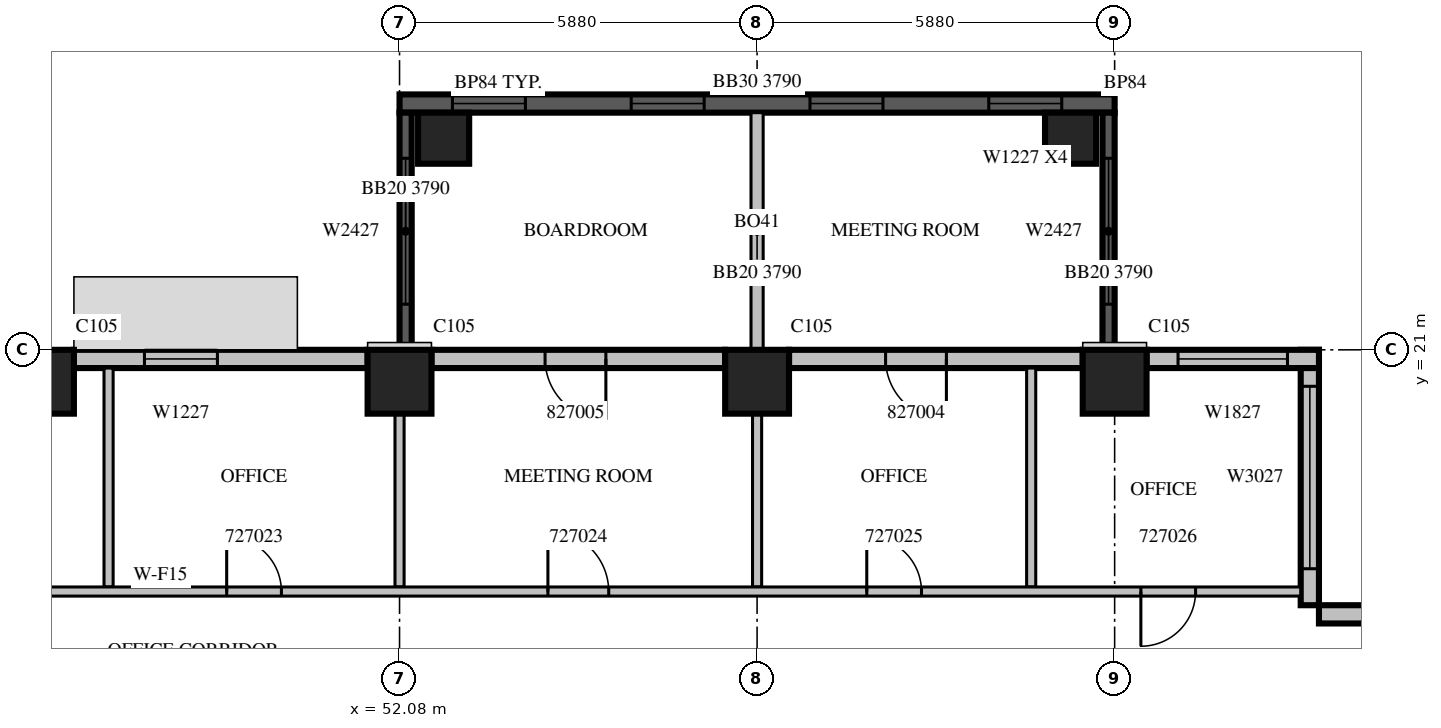
"""IFC4 building model, lengths in metres.
Left out: names, types, materials, properties, quantities, classifications, styles, units other than length and angle.
Written with IfcOpenShell. Run it as: python <this file> out.ifc"""

import sys

from ifc_helpers import new_model, si_unit, direction, frame, frame_2d, origin, origin_2d, place, context, subcontext, project, spatial, rectangle, extrude, source, transform, mapped, element, fill, save


model = new_model("IFC4")
c1 = context("Model", 3, precision=1e-05, world=origin(), true_north=direction((0.0, 1.0)))
c2 = subcontext(c1, "Body", "Model", "MODEL_VIEW")
j1 = project(units=[si_unit("LENGTHUNIT", "METRE"), si_unit("PLANEANGLEUNIT", "RADIAN")], contexts=[c1])
p1 = place(None, origin())
s1 = spatial("IfcSite", under=j1, at=p1, CompositionType="ELEMENT")
p2 = place(p1, origin())
s2 = spatial("IfcBuilding", under=s1, at=p2, CompositionType="ELEMENT")
p3 = place(p2, frame((0.0, 0.0, 124.5)))
s3 = spatial("IfcBuildingStorey", under=s2, at=p3, CompositionType="ELEMENT", Elevation=124.5)
m1 = source(origin(), c2, "Body", "SweptSolid", [
    extrude(rectangle(XDim=1.05, YDim=1.05, at=origin_2d()), origin(), (0.0, 0.0, 1.0), 4.2),
])
for number, where, z_axis, x_axis in (
    (1, (46.2, 20.475, 0.0), (0.0, 0.0, 1.0), (1.0, 0.0, 0.0)),
    (2, (52.08, 20.475, 0.0), (0.0, 0.0, 1.0), (1.0, 0.0, 0.0)),
    (3, (57.96, 20.475, 0.0), (0.0, 0.0, 1.0), (1.0, 0.0, 0.0)),
    (4, (63.84, 20.475, 0.0), (0.0, 0.0, 1.0), (1.0, 0.0, 0.0)),
):
    element("IfcColumn", number, at=place(p3, frame(where, z_axis=z_axis, x_axis=x_axis)), inside=s3, PredefinedType="COLUMN", context=c2, shape_type="MappedRepresentation", body=[
        mapped(m1, transform((0.0, 0.0, 0.0), scale=1.0)),
    ])
m2 = source(origin(), c2, "Body", "SweptSolid", [
    extrude(rectangle(XDim=0.84, YDim=0.84, at=origin_2d()), origin(), (0.0, 0.0, 1.0), 4.2),
])
for number, where, z_axis, x_axis in (
    (5, (52.805, 24.48, 0.0), (0.0, 0.0, 1.0), (1.0, 0.0, 0.0)),
    (6, (63.115, 24.48, 0.0), (0.0, 0.0, 1.0), (1.0, 0.0, 0.0)),
):
    element("IfcColumn", number, at=place(p3, frame(where, z_axis=z_axis, x_axis=x_axis)), inside=s3, PredefinedType="COLUMN", context=c2, shape_type="MappedRepresentation", body=[
        mapped(m2, transform((0.0, 0.0, 0.0), scale=1.0)),
    ])
m3 = source(origin(), c2, "Body", "SweptSolid", [
    extrude(rectangle(XDim=11.76, YDim=0.3, at=frame_2d((5.88, 0.0))), origin(), (0.0, 0.0, 1.0), 3.79),
])
p4 = place(p3, frame((63.84, 25.05, 0.0), z_axis=(0.0, 0.0, 1.0), x_axis=(-1.0, 0.0, 0.0)))
e7 = element("IfcWall", 7, at=p4, inside=s3, PredefinedType="SOLIDWALL", context=c2, shape_type="MappedRepresentation", body=[
    mapped(m3, transform((0.0, 0.0, 0.0), scale=1.0)),
])
m4 = source(origin(), c2, "Body", "SweptSolid", [
    extrude(rectangle(XDim=1.2, YDim=2.7, at=frame_2d((0.6, 1.35))), frame((0.0, 0.16, 0.0), z_axis=(0.0, -1.0, 0.0), x_axis=(1.0, 0.0, 0.0)), (0.0, 0.0, 1.0), 0.32),
])
p5 = place(p4, frame((0.87, 0.0, 0.6)))
e8 = element("IfcOpeningElement", 8, at=p5, cuts=e7, PredefinedType="OPENING", context=c2, shape_type="MappedRepresentation", body=[
    mapped(m4, transform((0.0, 0.0, 0.0), scale=1.0)),
])
p6 = place(p4, frame((3.81, 0.0, 0.6)))
e9 = element("IfcOpeningElement", 9, at=p6, cuts=e7, PredefinedType="OPENING", context=c2, shape_type="MappedRepresentation", body=[
    mapped(m4, transform((0.0, 0.0, 0.0), scale=1.0)),
])
p7 = place(p4, frame((6.75, 0.0, 0.6)))
e10 = element("IfcOpeningElement", 10, at=p7, cuts=e7, PredefinedType="OPENING", context=c2, shape_type="MappedRepresentation", body=[
    mapped(m4, transform((0.0, 0.0, 0.0), scale=1.0)),
])
p8 = place(p4, frame((9.69, 0.0, 0.6)))
e11 = element("IfcOpeningElement", 11, at=p8, cuts=e7, PredefinedType="OPENING", context=c2, shape_type="MappedRepresentation", body=[
    mapped(m4, transform((0.0, 0.0, 0.0), scale=1.0)),
])
m5 = source(origin(), c2, "Body", "SweptSolid", [
    extrude(rectangle(XDim=3.9, YDim=0.2, at=frame_2d((1.95, 0.0))), origin(), (0.0, 0.0, 1.0), 3.79),
])
p9 = place(p3, frame((57.96, 21.0, 0.0), z_axis=(0.0, 0.0, 1.0), x_axis=(0.0, 1.0, 0.0)))
e12 = element("IfcWall", 12, at=p9, inside=s3, PredefinedType="SOLIDWALL", context=c2, shape_type="MappedRepresentation", body=[
    mapped(m5, transform((0.0, 0.0, 0.0), scale=1.0)),
])
m6 = source(origin(), c2, "Body", "SweptSolid", [
    extrude(rectangle(XDim=3.9, YDim=0.2, at=frame_2d((1.95, 0.0))), origin(), (0.0, 0.0, 1.0), 3.79),
])
p10 = place(p3, frame((63.74, 21.0, 0.0), z_axis=(0.0, 0.0, 1.0), x_axis=(0.0, 1.0, 0.0)))
e13 = element("IfcWall", 13, at=p10, inside=s3, PredefinedType="SOLIDWALL", context=c2, shape_type="MappedRepresentation", body=[
    mapped(m6, transform((0.0, 0.0, 0.0), scale=1.0)),
])
m7 = source(origin(), c2, "Body", "SweptSolid", [
    extrude(rectangle(XDim=2.4, YDim=2.7, at=frame_2d((1.2, 1.35))), frame((0.0, 0.11, 0.0), z_axis=(0.0, -1.0, 0.0), x_axis=(1.0, 0.0, 0.0)), (0.0, 0.0, 1.0), 0.22),
])
p11 = place(p10, frame((0.75, 0.0, 0.6)))
e14 = element("IfcOpeningElement", 14, at=p11, cuts=e13, PredefinedType="OPENING", context=c2, shape_type="MappedRepresentation", body=[
    mapped(m7, transform((0.0, 0.0, 0.0), scale=1.0)),
])
p12 = place(p3, frame((52.18, 21.0, 0.0), z_axis=(0.0, 0.0, 1.0), x_axis=(0.0, 1.0, 0.0)))
e15 = element("IfcWall", 15, at=p12, inside=s3, PredefinedType="SOLIDWALL", context=c2, shape_type="MappedRepresentation", body=[
    mapped(m6, transform((0.0, 0.0, 0.0), scale=1.0)),
])
p13 = place(p12, frame((0.75, 0.0, 0.6)))
e16 = element("IfcOpeningElement", 16, at=p13, cuts=e15, PredefinedType="OPENING", context=c2, shape_type="MappedRepresentation", body=[
    mapped(m7, transform((0.0, 0.0, 0.0), scale=1.0)),
])
m8 = source(origin(), c2, "Body", "SweptSolid", [
    extrude(rectangle(XDim=4.2, YDim=0.3, at=frame_2d((2.1, 0.0))), origin(), (0.0, 0.0, 1.0), 3.8),
])
p14 = place(p3, frame((71.4, 16.65, 0.0), z_axis=(0.0, 0.0, 1.0), x_axis=(-1.0, 0.0, 0.0)))
e17 = element("IfcWall", 17, at=p14, inside=s3, PredefinedType="STANDARD", context=c2, shape_type="MappedRepresentation", body=[
    mapped(m8, transform((0.0, 0.0, 0.0), scale=1.0)),
])
p15 = place(p14, frame((0.66, 0.0, 0.6)))
e18 = element("IfcOpeningElement", 18, at=p15, cuts=e17, PredefinedType="OPENING", context=c2, shape_type="MappedRepresentation", body=[
    mapped(m4, transform((0.0, 0.0, 0.0), scale=1.0)),
])
p16 = place(p3, frame((67.05, 16.8, 0.0), z_axis=(0.0, 0.0, 1.0), x_axis=(0.0, 1.0, 0.0)))
e19 = element("IfcWall", 19, at=p16, inside=s3, PredefinedType="STANDARD", context=c2, shape_type="MappedRepresentation", body=[
    mapped(m8, transform((0.0, 0.0, 0.0), scale=1.0)),
])
m9 = source(origin(), c2, "Body", "SweptSolid", [
    extrude(rectangle(XDim=3.0, YDim=2.7, at=frame_2d((1.5, 1.35))), frame((0.0, 0.16, 0.0), z_axis=(0.0, -1.0, 0.0), x_axis=(1.0, 0.0, 0.0)), (0.0, 0.0, 1.0), 0.32),
])
p17 = place(p16, frame((0.6, 0.0, 0.6)))
e20 = element("IfcOpeningElement", 20, at=p17, cuts=e19, PredefinedType="OPENING", context=c2, shape_type="MappedRepresentation", body=[
    mapped(m9, transform((0.0, 0.0, 0.0), scale=1.0)),
])
m10 = source(origin(), c2, "Body", "SweptSolid", [
    extrude(rectangle(XDim=2.835, YDim=0.3, at=frame_2d((1.417, 0.0))), origin(), (0.0, 0.0, 1.0), 3.8),
])
p18 = place(p3, frame((67.2, 20.85, 0.0), z_axis=(0.0, 0.0, 1.0), x_axis=(-1.0, 0.0, 0.0)))
e21 = element("IfcWall", 21, at=p18, inside=s3, PredefinedType="STANDARD", context=c2, shape_type="MappedRepresentation", body=[
    mapped(m10, transform((0.0, 0.0, 0.0), scale=1.0)),
])
m11 = source(origin(), c2, "Body", "SweptSolid", [
    extrude(rectangle(XDim=1.8, YDim=2.7, at=frame_2d((0.9, 1.35))), frame((0.0, 0.16, 0.0), z_axis=(0.0, -1.0, 0.0), x_axis=(1.0, 0.0, 0.0)), (0.0, 0.0, 1.0), 0.32),
])
p19 = place(p18, frame((0.517, 0.0, 0.6)))
e22 = element("IfcOpeningElement", 22, at=p19, cuts=e21, PredefinedType="OPENING", context=c2, shape_type="MappedRepresentation", body=[
    mapped(m11, transform((0.0, 0.0, 0.0), scale=1.0)),
])
m12 = source(origin(), c2, "Body", "SweptSolid", [
    extrude(rectangle(XDim=4.83, YDim=0.3, at=frame_2d((2.415, 0.0))), origin(), (0.0, 0.0, 1.0), 3.8),
])
p20 = place(p3, frame((63.315, 20.85, 0.0), z_axis=(0.0, 0.0, 1.0), x_axis=(-1.0, 0.0, 0.0)))
e23 = element("IfcWall", 23, at=p20, inside=s3, PredefinedType="STANDARD", context=c2, shape_type="MappedRepresentation", body=[
    mapped(m12, transform((0.0, 0.0, 0.0), scale=1.0)),
])
m13 = source(origin(), c2, "Body", "SweptSolid", [
    extrude(rectangle(XDim=1.0, YDim=2.1, at=frame_2d((0.5, 1.05))), frame((0.0, 0.16, 0.0), z_axis=(0.0, -1.0, 0.0), x_axis=(1.0, 0.0, 0.0)), (0.0, 0.0, 1.0), 0.32),
])
p21 = place(p20, frame((2.242, 0.0, 0.0)))
e24 = element("IfcOpeningElement", 24, at=p21, cuts=e23, PredefinedType="OPENING", context=c2, shape_type="MappedRepresentation", body=[
    mapped(m13, transform((0.0, 0.0, 0.0), scale=1.0)),
])
p22 = place(p3, frame((57.435, 20.85, 0.0), z_axis=(0.0, 0.0, 1.0), x_axis=(-1.0, 0.0, 0.0)))
e25 = element("IfcWall", 25, at=p22, inside=s3, PredefinedType="STANDARD", context=c2, shape_type="MappedRepresentation", body=[
    mapped(m12, transform((0.0, 0.0, 0.0), scale=1.0)),
])
p23 = place(p22, frame((1.962, 0.0, 0.0)))
e26 = element("IfcOpeningElement", 26, at=p23, cuts=e25, PredefinedType="OPENING", context=c2, shape_type="MappedRepresentation", body=[
    mapped(m13, transform((0.0, 0.0, 0.0), scale=1.0)),
])
p24 = place(p3, frame((51.555, 20.85, 0.0), z_axis=(0.0, 0.0, 1.0), x_axis=(-1.0, 0.0, 0.0)))
e27 = element("IfcWall", 27, at=p24, inside=s3, PredefinedType="STANDARD", context=c2, shape_type="MappedRepresentation", body=[
    mapped(m12, transform((0.0, 0.0, 0.0), scale=1.0)),
])
p25 = place(p24, frame((2.47, 0.0, 0.6)))
e28 = element("IfcOpeningElement", 28, at=p25, cuts=e27, PredefinedType="OPENING", context=c2, shape_type="MappedRepresentation", body=[
    mapped(m4, transform((0.0, 0.0, 0.0), scale=1.0)),
])
m14 = source(origin(), c2, "Body", "SweptSolid", [
    extrude(rectangle(XDim=3.6, YDim=0.15, at=frame_2d((1.8, 0.0))), origin(), (0.0, 0.0, 1.0), 3.8),
])
for number, where, z_axis, x_axis in (
    (29, (47.295, 20.7, 0.0), (0.0, 0.0, 1.0), (0.0, -1.0, 0.0)),
    (30, (62.468, 20.7, 0.0), (0.0, 0.0, 1.0), (0.0, -1.0, 0.0)),
):
    element("IfcWall", number, at=place(p3, frame(where, z_axis=z_axis, x_axis=x_axis)), inside=s3, PredefinedType="PARTITIONING", context=c2, shape_type="MappedRepresentation", body=[
        mapped(m14, transform((0.0, 0.0, 0.0), scale=1.0)),
    ])
m15 = source(origin(), c2, "Body", "SweptSolid", [
    extrude(rectangle(XDim=2.851, YDim=0.15, at=frame_2d((1.425, 0.0))), origin(), (0.0, 0.0, 1.0), 3.8),
])
for number, where, z_axis, x_axis in (
    (31, (52.08, 17.1, 0.0), (0.0, 0.0, 1.0), (0.0, 1.0, 0.0)),
    (32, (57.96, 17.1, 0.0), (0.0, 0.0, 1.0), (0.0, 1.0, 0.0)),
):
    element("IfcWall", number, at=place(p3, frame(where, z_axis=z_axis, x_axis=x_axis)), inside=s3, PredefinedType="PARTITIONING", context=c2, shape_type="MappedRepresentation", body=[
        mapped(m15, transform((0.0, 0.0, 0.0), scale=1.0)),
    ])
m16 = source(origin(), c2, "Body", "SweptSolid", [
    extrude(rectangle(XDim=37.5, YDim=0.15, at=frame_2d((18.75, 0.0))), origin(), (0.0, 0.0, 1.0), 3.8),
])
p26 = place(p3, frame((29.4, 17.025, 0.0), z_axis=(0.0, 0.0, 1.0), x_axis=(1.0, 0.0, 0.0)))
e33 = element("IfcWall", 33, at=p26, inside=s3, PredefinedType="PARTITIONING", context=c2, shape_type="MappedRepresentation", body=[
    mapped(m16, transform((0.0, 0.0, 0.0), scale=1.0)),
])
m17 = source(origin(), c2, "Body", "SweptSolid", [
    extrude(rectangle(XDim=1.0, YDim=2.1, at=frame_2d((0.5, 1.05))), frame((0.0, 0.085, 0.0), z_axis=(0.0, -1.0, 0.0), x_axis=(1.0, 0.0, 0.0)), (0.0, 0.0, 1.0), 0.17),
])
p27 = place(p26, frame((1.357, 0.0, 0.0)))
e34 = element("IfcOpeningElement", 34, at=p27, cuts=e33, PredefinedType="OPENING", context=c2, shape_type="MappedRepresentation", body=[
    mapped(m17, transform((0.0, 0.0, 0.0), scale=1.0)),
])
p28 = place(p26, frame((4.669, 0.0, 0.0)))
e35 = element("IfcOpeningElement", 35, at=p28, cuts=e33, PredefinedType="OPENING", context=c2, shape_type="MappedRepresentation", body=[
    mapped(m17, transform((0.0, 0.0, 0.0), scale=1.0)),
])
p29 = place(p26, frame((7.012, 0.0, 0.0)))
e36 = element("IfcOpeningElement", 36, at=p29, cuts=e33, PredefinedType="OPENING", context=c2, shape_type="MappedRepresentation", body=[
    mapped(m17, transform((0.0, 0.0, 0.0), scale=1.0)),
])
m18 = source(origin(), c2, "Body", "SweptSolid", [
    extrude(rectangle(XDim=0.9, YDim=2.1, at=frame_2d((0.45, 1.05))), frame((0.0, 0.085, 0.0), z_axis=(0.0, -1.0, 0.0), x_axis=(1.0, 0.0, 0.0)), (0.0, 0.0, 1.0), 0.17),
])
p30 = place(p26, frame((10.342, 0.0, 0.0)))
e37 = element("IfcOpeningElement", 37, at=p30, cuts=e33, PredefinedType="OPENING", context=c2, shape_type="MappedRepresentation", body=[
    mapped(m18, transform((0.0, 0.0, 0.0), scale=1.0)),
])
p31 = place(p26, frame((15.09, 0.0, 0.0)))
e38 = element("IfcOpeningElement", 38, at=p31, cuts=e33, PredefinedType="OPENING", context=c2, shape_type="MappedRepresentation", body=[
    mapped(m18, transform((0.0, 0.0, 0.0), scale=1.0)),
])
p32 = place(p26, frame((19.837, 0.0, 0.0)))
e39 = element("IfcOpeningElement", 39, at=p32, cuts=e33, PredefinedType="OPENING", context=c2, shape_type="MappedRepresentation", body=[
    mapped(m18, transform((0.0, 0.0, 0.0), scale=1.0)),
])
p33 = place(p26, frame((25.12, 0.0, 0.0)))
e40 = element("IfcOpeningElement", 40, at=p33, cuts=e33, PredefinedType="OPENING", context=c2, shape_type="MappedRepresentation", body=[
    mapped(m17, transform((0.0, 0.0, 0.0), scale=1.0)),
])
p34 = place(p26, frame((30.364, 0.0, 0.0)))
e41 = element("IfcOpeningElement", 41, at=p34, cuts=e33, PredefinedType="OPENING", context=c2, shape_type="MappedRepresentation", body=[
    mapped(m18, transform((0.0, 0.0, 0.0), scale=1.0)),
])
p35 = place(p26, frame((34.871, 0.0, 0.0)))
e42 = element("IfcOpeningElement", 42, at=p35, cuts=e33, PredefinedType="OPENING", context=c2, shape_type="MappedRepresentation", body=[
    mapped(m18, transform((0.0, 0.0, 0.0), scale=1.0)),
])
m19 = source(origin(), c2, "Body", "SweptSolid", [
    extrude(rectangle(XDim=1.2, YDim=2.7, at=frame_2d((0.6, 1.35))), frame((0.0, 0.03, 0.0), z_axis=(0.0, -1.0, 0.0), x_axis=(1.0, 0.0, 0.0)), (0.0, 0.0, 1.0), 0.06),
])
p36 = place(p5, origin())
e43 = element("IfcWindow", 43, at=p36, inside=s3, PartitioningType="SINGLE_PANEL", PredefinedType="WINDOW", context=c2, shape_type="MappedRepresentation", body=[
    mapped(m19, transform((0.0, 0.0, 0.0), scale=1.0)),
])
fill(e8, e43)
p37 = place(p6, origin())
e44 = element("IfcWindow", 44, at=p37, inside=s3, PartitioningType="SINGLE_PANEL", PredefinedType="WINDOW", context=c2, shape_type="MappedRepresentation", body=[
    mapped(m19, transform((0.0, 0.0, 0.0), scale=1.0)),
])
fill(e9, e44)
p38 = place(p7, origin())
e45 = element("IfcWindow", 45, at=p38, inside=s3, PartitioningType="SINGLE_PANEL", PredefinedType="WINDOW", context=c2, shape_type="MappedRepresentation", body=[
    mapped(m19, transform((0.0, 0.0, 0.0), scale=1.0)),
])
fill(e10, e45)
p39 = place(p8, origin())
e46 = element("IfcWindow", 46, at=p39, inside=s3, PartitioningType="SINGLE_PANEL", PredefinedType="WINDOW", context=c2, shape_type="MappedRepresentation", body=[
    mapped(m19, transform((0.0, 0.0, 0.0), scale=1.0)),
])
fill(e11, e46)
m20 = source(origin(), c2, "Body", "SweptSolid", [
    extrude(rectangle(XDim=2.4, YDim=2.7, at=frame_2d((1.2, 1.35))), frame((0.0, 0.03, 0.0), z_axis=(0.0, -1.0, 0.0), x_axis=(1.0, 0.0, 0.0)), (0.0, 0.0, 1.0), 0.06),
])
p40 = place(p11, origin())
e47 = element("IfcWindow", 47, at=p40, inside=s3, PartitioningType="SINGLE_PANEL", PredefinedType="WINDOW", context=c2, shape_type="MappedRepresentation", body=[
    mapped(m20, transform((0.0, 0.0, 0.0), scale=1.0)),
])
fill(e14, e47)
p41 = place(p13, origin())
e48 = element("IfcWindow", 48, at=p41, inside=s3, PartitioningType="SINGLE_PANEL", PredefinedType="WINDOW", context=c2, shape_type="MappedRepresentation", body=[
    mapped(m20, transform((0.0, 0.0, 0.0), scale=1.0)),
])
fill(e16, e48)
m21 = source(origin(), c2, "Body", "SweptSolid", [
    extrude(rectangle(XDim=3.0, YDim=2.7, at=frame_2d((1.5, 1.35))), frame((0.0, 0.03, 0.0), z_axis=(0.0, -1.0, 0.0), x_axis=(1.0, 0.0, 0.0)), (0.0, 0.0, 1.0), 0.06),
])
p42 = place(p17, origin())
e49 = element("IfcWindow", 49, at=p42, inside=s3, PartitioningType="SINGLE_PANEL", PredefinedType="WINDOW", context=c2, shape_type="MappedRepresentation", body=[
    mapped(m21, transform((0.0, 0.0, 0.0), scale=1.0)),
])
fill(e20, e49)
p43 = place(p25, origin())
e50 = element("IfcWindow", 50, at=p43, inside=s3, PartitioningType="SINGLE_PANEL", PredefinedType="WINDOW", context=c2, shape_type="MappedRepresentation", body=[
    mapped(m19, transform((0.0, 0.0, 0.0), scale=1.0)),
])
fill(e28, e50)
m22 = source(origin(), c2, "Body", "SweptSolid", [
    extrude(rectangle(XDim=1.8, YDim=2.7, at=frame_2d((0.9, 1.35))), frame((0.0, 0.03, 0.0), z_axis=(0.0, -1.0, 0.0), x_axis=(1.0, 0.0, 0.0)), (0.0, 0.0, 1.0), 0.06),
])
p44 = place(p19, origin())
e51 = element("IfcWindow", 51, at=p44, inside=s3, PartitioningType="SINGLE_PANEL", PredefinedType="WINDOW", context=c2, shape_type="MappedRepresentation", body=[
    mapped(m22, transform((0.0, 0.0, 0.0), scale=1.0)),
])
fill(e22, e51)
m23 = source(origin(), c2, "Body", "SweptSolid", [
    extrude(rectangle(XDim=0.9, YDim=2.1, at=frame_2d((0.45, 1.05))), frame((0.0, 0.025, 0.0), z_axis=(0.0, -1.0, 0.0), x_axis=(1.0, 0.0, 0.0)), (0.0, 0.0, 1.0), 0.05),
])
p45 = place(p32, origin())
e52 = element("IfcDoor", 52, at=p45, inside=s3, OperationType="SINGLE_SWING_LEFT", PredefinedType="DOOR", context=c2, shape_type="MappedRepresentation", body=[
    mapped(m23, transform((0.0, 0.0, 0.0), scale=1.0)),
])
fill(e39, e52)
m24 = source(origin(), c2, "Body", "SweptSolid", [
    extrude(rectangle(XDim=1.0, YDim=2.1, at=frame_2d((0.5, 1.05))), frame((0.0, 0.025, 0.0), z_axis=(0.0, -1.0, 0.0), x_axis=(1.0, 0.0, 0.0)), (0.0, 0.0, 1.0), 0.05),
])
p46 = place(p33, origin())
e53 = element("IfcDoor", 53, at=p46, inside=s3, OperationType="SINGLE_SWING_LEFT", PredefinedType="DOOR", context=c2, shape_type="MappedRepresentation", body=[
    mapped(m24, transform((0.0, 0.0, 0.0), scale=1.0)),
])
fill(e40, e53)
p47 = place(p34, origin())
e54 = element("IfcDoor", 54, at=p47, inside=s3, OperationType="SINGLE_SWING_LEFT", PredefinedType="DOOR", context=c2, shape_type="MappedRepresentation", body=[
    mapped(m23, transform((0.0, 0.0, 0.0), scale=1.0)),
])
fill(e41, e54)
p48 = place(p35, origin())
e55 = element("IfcDoor", 55, at=p48, inside=s3, OperationType="SINGLE_SWING_RIGHT", PredefinedType="DOOR", context=c2, shape_type="MappedRepresentation", body=[
    mapped(m23, transform((0.0, 0.0, 0.0), scale=1.0)),
])
fill(e42, e55)
p49 = place(p21, origin())
e56 = element("IfcDoor", 56, at=p49, inside=s3, OperationType="SINGLE_SWING_LEFT", PredefinedType="DOOR", context=c2, shape_type="MappedRepresentation", body=[
    mapped(m24, transform((0.0, 0.0, 0.0), scale=1.0)),
])
fill(e24, e56)
p50 = place(p23, origin())
e57 = element("IfcDoor", 57, at=p50, inside=s3, OperationType="SINGLE_SWING_LEFT", PredefinedType="DOOR", context=c2, shape_type="MappedRepresentation", body=[
    mapped(m24, transform((0.0, 0.0, 0.0), scale=1.0)),
])
fill(e26, e57)
save(model, sys.argv[1])
